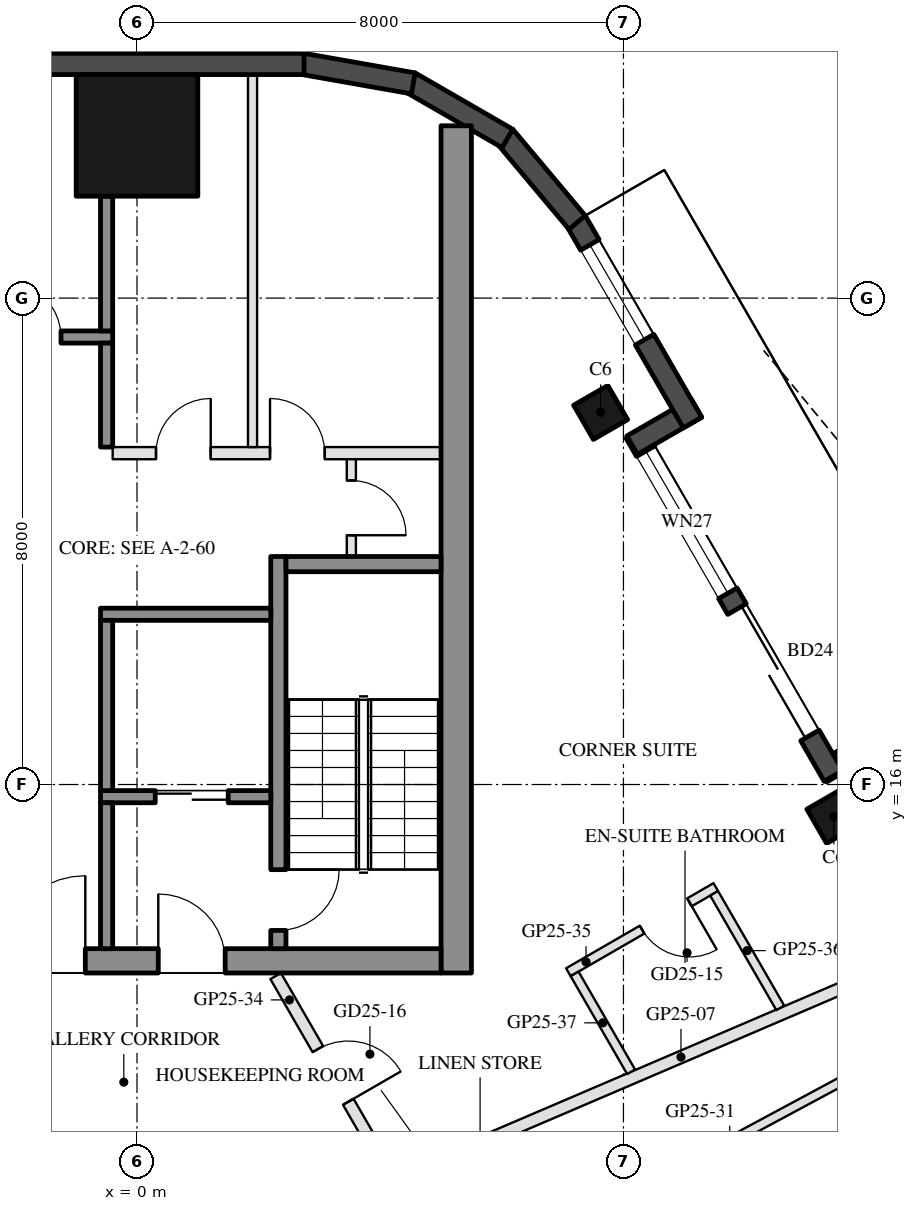
"""IFC4 building model, lengths in metres.
Left out: names, types, materials, properties, quantities, classifications, styles, units other than length and angle.
Written with IfcOpenShell. Run it as: python <this file> out.ifc"""

import sys

from ifc_helpers import new_model, si_unit, direction, frame, frame_2d, origin, origin_2d, place, context, subcontext, project, spatial, rectangle, hollow_rectangle, extrude, boolean, halfspace, element, fill, save


model = new_model("IFC4")
c1 = context("Model", 3, precision=1e-05, world=origin(), true_north=direction((0.0, 1.0)))
c2 = subcontext(c1, "Body", "Model", "MODEL_VIEW")
j1 = project(units=[si_unit("LENGTHUNIT", "METRE"), si_unit("PLANEANGLEUNIT", "RADIAN")], contexts=[c1])
p1 = place(None, origin())
s1 = spatial("IfcSite", under=j1, at=p1, CompositionType="ELEMENT")
p2 = place(p1, origin())
s2 = spatial("IfcBuilding", under=s1, at=p2, CompositionType="ELEMENT")
p3 = place(p2, frame((0.0, 0.0, 257.8)))
s3 = spatial("IfcBuildingStorey", under=s2, at=p3, CompositionType="ELEMENT", Elevation=257.8)
p4 = place(p3, frame((11.461, 15.475, 0.0), z_axis=(0.0, 0.0, 1.0), x_axis=(-0.5, 0.866025403784, 0.0)))
e1 = element("IfcColumn", 1, at=p4, inside=s3, PredefinedType="COLUMN", context=c2, shape_type="SweptSolid", body=[
    boolean("DIFFERENCE", extrude(hollow_rectangle(XDim=0.65, YDim=0.65, WallThickness=0.03, at=origin_2d()), origin(), (0.0, 0.0, 1.0), 3.7), halfspace(frame((0.0, 0.0, 0.04), z_axis=(0.0, 0.0, 1.0), x_axis=(1.0, 0.0, 0.0)), True)),
])
p5 = place(p3, frame((7.625, 22.119, 0.0), z_axis=(0.0, 0.0, 1.0), x_axis=(-0.5, 0.866025403784, 0.0)))
e2 = element("IfcColumn", 2, at=p5, inside=s3, PredefinedType="COLUMN", context=c2, shape_type="SweptSolid", body=[
    boolean("DIFFERENCE", extrude(hollow_rectangle(XDim=0.65, YDim=0.65, WallThickness=0.03, at=origin_2d()), origin(), (0.0, 0.0, 1.0), 3.7), halfspace(frame((0.0, 0.0, 0.047), z_axis=(0.0, 0.0, 1.0), x_axis=(1.0, 0.0, 0.0)), True)),
])
p6 = place(p3, frame((0.0, 26.676, 0.0), z_axis=(0.0, 0.0, 1.0), x_axis=(1.0, 0.0, 0.0)))
e3 = element("IfcColumn", 3, at=p6, inside=s3, PredefinedType="COLUMN", context=c2, shape_type="SweptSolid", body=[
    boolean("DIFFERENCE", extrude(hollow_rectangle(XDim=2.0, YDim=2.0, WallThickness=0.05, at=origin_2d()), origin(), (0.0, 0.0, 1.0), 3.7), halfspace(frame((0.0, 0.0, 0.112), z_axis=(0.0, 0.0, 1.0), x_axis=(1.0, 0.0, 0.0)), True)),
])
p7 = place(p3, frame((12.311, 16.803, 0.0), z_axis=(0.0, 0.0, 1.0), x_axis=(-0.866005645448, -0.500034220881, 0.0)))
e4 = element("IfcWall", 4, at=p7, inside=s3, PredefinedType="SOLIDWALL", context=c2, shape_type="SweptSolid", body=[
    extrude(rectangle(XDim=1.22, YDim=0.35, at=frame_2d((0.61, 0.0))), origin(), (0.0, 0.0, 1.0), 3.55),
])
p8 = place(p3, frame((11.452, 16.14, 0.0), z_axis=(0.0, 0.0, 1.0), x_axis=(-0.49998210071, 0.866035737698, 0.0)))
e5 = element("IfcWall", 5, at=p8, inside=s3, PredefinedType="SOLIDWALL", context=c2, shape_type="SweptSolid", body=[
    extrude(rectangle(XDim=6.511, YDim=0.35, at=frame_2d((3.256, 0.0))), origin(), (0.0, 0.0, 1.0), 3.55),
])
p9 = place(p8, frame((0.77, 0.0, 0.0)))
e6 = element("IfcOpeningElement", 6, at=p9, cuts=e5, PredefinedType="OPENING", context=c2, shape_type="SweptSolid", body=[
    extrude(rectangle(XDim=2.4, YDim=2.4, at=frame_2d((1.2, 1.2))), frame((0.0, 0.185, 0.0), z_axis=(0.0, -1.0, 0.0), x_axis=(1.0, 0.0, 0.0)), (0.0, 0.0, 1.0), 0.37),
])
p10 = place(p8, frame((3.47, 0.0, 0.3)))
e7 = element("IfcOpeningElement", 7, at=p10, cuts=e5, PredefinedType="OPENING", context=c2, shape_type="SweptSolid", body=[
    extrude(rectangle(XDim=2.7, YDim=2.65, at=frame_2d((1.35, 1.325))), frame((0.0, 0.185, 0.0), z_axis=(0.0, -1.0, 0.0), x_axis=(1.0, 0.0, 0.0)), (0.0, 0.0, 1.0), 0.37),
])
p11 = place(p3, frame((8.143, 21.582, 0.0), z_axis=(0.0, 0.0, 1.0), x_axis=(0.866092288191, 0.499884134912, 0.0)))
e8 = element("IfcWall", 8, at=p11, inside=s3, PredefinedType="SOLIDWALL", context=c2, shape_type="SweptSolid", body=[
    extrude(rectangle(XDim=1.22, YDim=0.35, at=frame_2d((0.61, 0.0))), origin(), (0.0, 0.0, 1.0), 3.55),
])
p12 = place(p3, frame((9.135, 21.952, 0.0), z_axis=(0.0, 0.0, 1.0), x_axis=(-0.499972675833, 0.866041178825, 0.0)))
e9 = element("IfcWall", 9, at=p12, inside=s3, PredefinedType="SOLIDWALL", context=c2, shape_type="SweptSolid", body=[
    extrude(rectangle(XDim=3.829, YDim=0.35, at=frame_2d((1.915, 0.0))), origin(), (0.0, 0.0, 1.0), 3.55),
])
p13 = place(p12, frame((1.575, 0.0, 0.3)))
e10 = element("IfcOpeningElement", 10, at=p13, cuts=e9, PredefinedType="OPENING", context=c2, shape_type="SweptSolid", body=[
    extrude(rectangle(XDim=1.8, YDim=2.65, at=frame_2d((0.9, 1.325))), frame((0.0, 0.185, 0.0), z_axis=(0.0, -1.0, 0.0), x_axis=(1.0, 0.0, 0.0)), (0.0, 0.0, 1.0), 0.37),
])
p14 = place(p3, frame((7.239, 25.243, 0.0), z_axis=(0.0, 0.0, 1.0), x_axis=(-0.642756798522, 0.7660702957, 0.0)))
e11 = element("IfcWall", 11, at=p14, inside=s3, PredefinedType="SOLIDWALL", context=c2, shape_type="SweptSolid", body=[
    extrude(rectangle(XDim=1.855, YDim=0.35, at=frame_2d((0.928, 0.0))), origin(), (0.0, 0.0, 1.0), 3.55),
])
p15 = place(p3, frame((6.093, 26.625, 0.0), z_axis=(0.0, 0.0, 1.0), x_axis=(-0.866080385203, 0.499904757295, 0.0)))
e12 = element("IfcWall", 12, at=p15, inside=s3, PredefinedType="SOLIDWALL", context=c2, shape_type="SweptSolid", body=[
    extrude(rectangle(XDim=1.855, YDim=0.35, at=frame_2d((0.927, 0.0))), origin(), (0.0, 0.0, 1.0), 3.55),
])
p16 = place(p3, frame((4.544, 27.532, 0.0), z_axis=(0.0, 0.0, 1.0), x_axis=(-0.984795480386, 0.173717764815, 0.0)))
e13 = element("IfcWall", 13, at=p16, inside=s3, PredefinedType="SOLIDWALL", context=c2, shape_type="SweptSolid", body=[
    extrude(rectangle(XDim=1.855, YDim=0.35, at=frame_2d((0.928, 0.0))), origin(), (0.0, 0.0, 1.0), 3.55),
])
p17 = place(p3, frame((2.747, 27.851, 0.0), z_axis=(0.0, 0.0, 1.0), x_axis=(-1.0, 0.0, 0.0)))
e14 = element("IfcWall", 14, at=p17, inside=s3, PredefinedType="SOLIDWALL", context=c2, shape_type="SweptSolid", body=[
    extrude(rectangle(XDim=5.495, YDim=0.35, at=frame_2d((2.747, 0.0))), origin(), (0.0, 0.0, 1.0), 3.55),
])
p18 = place(p3, frame((5.25, 12.9, 0.0), z_axis=(0.0, 0.0, 1.0), x_axis=(0.0, 1.0, 0.0)))
e15 = element("IfcWall", 15, at=p18, inside=s3, PredefinedType="SHEAR", context=c2, shape_type="SweptSolid", body=[
    extrude(rectangle(XDim=13.934, YDim=0.5, at=frame_2d((6.967, 0.0))), origin(), (0.0, 0.0, 1.0), 3.5),
])
p19 = place(p3, frame((5.0, 13.1, 0.0), z_axis=(0.0, 0.0, 1.0), x_axis=(-1.0, 0.0, 0.0)))
e16 = element("IfcWall", 16, at=p19, inside=s3, PredefinedType="SHEAR", context=c2, shape_type="SweptSolid", body=[
    extrude(rectangle(XDim=10.0, YDim=0.4, at=frame_2d((5.0, 0.0))), origin(), (0.0, 0.0, 1.0), 3.5),
])
p20 = place(p19, frame((3.55, 0.0, 0.0)))
e17 = element("IfcOpeningElement", 17, at=p20, cuts=e16, PredefinedType="OPENING", context=c2, shape_type="SweptSolid", body=[
    extrude(rectangle(XDim=1.1, YDim=2.1, at=frame_2d((0.55, 1.05))), frame((0.0, 0.21, 0.0), z_axis=(0.0, -1.0, 0.0), x_axis=(1.0, 0.0, 0.0)), (0.0, 0.0, 1.0), 0.42),
])
p21 = place(p19, frame((5.85, 0.0, 0.0)))
e18 = element("IfcOpeningElement", 18, at=p21, cuts=e16, PredefinedType="OPENING", context=c2, shape_type="SweptSolid", body=[
    extrude(rectangle(XDim=1.4, YDim=2.1, at=frame_2d((0.7, 1.05))), frame((0.0, 0.21, 0.0), z_axis=(0.0, -1.0, 0.0), x_axis=(1.0, 0.0, 0.0)), (0.0, 0.0, 1.0), 0.42),
])
p22 = place(p3, frame((2.325, 13.3, 0.0), z_axis=(0.0, 0.0, 1.0), x_axis=(0.0, 1.0, 0.0)))
e19 = element("IfcWall", 19, at=p22, inside=s3, PredefinedType="SHEAR", context=c2, shape_type="SweptSolid", body=[
    extrude(rectangle(XDim=6.45, YDim=0.25, at=frame_2d((3.225, 0.0))), origin(), (0.0, 0.0, 1.0), 3.5),
])
p23 = place(p22, frame((0.3, 0.0, 0.0)))
e20 = element("IfcOpeningElement", 20, at=p23, cuts=e19, PredefinedType="OPENING", context=c2, shape_type="SweptSolid", body=[
    extrude(rectangle(XDim=1.0, YDim=2.1, at=frame_2d((0.5, 1.05))), frame((0.0, 0.135, 0.0), z_axis=(0.0, -1.0, 0.0), x_axis=(1.0, 0.0, 0.0)), (0.0, 0.0, 1.0), 0.27),
])
p24 = place(p3, frame((5.0, 19.625, 0.0), z_axis=(0.0, 0.0, 1.0), x_axis=(-1.0, 0.0, 0.0)))
e21 = element("IfcWall", 21, at=p24, inside=s3, PredefinedType="SHEAR", context=c2, shape_type="SweptSolid", body=[
    extrude(rectangle(XDim=2.55, YDim=0.25, at=frame_2d((1.275, 0.0))), origin(), (0.0, 0.0, 1.0), 3.5),
])
p25 = place(p3, frame((2.2, 18.8, 0.0), z_axis=(0.0, 0.0, 1.0), x_axis=(-1.0, 0.0, 0.0)))
e22 = element("IfcWall", 22, at=p25, inside=s3, PredefinedType="SHEAR", context=c2, shape_type="SweptSolid", body=[
    extrude(rectangle(XDim=2.8, YDim=0.2, at=frame_2d((1.4, 0.0))), origin(), (0.0, 0.0, 1.0), 3.5),
])
p26 = place(p3, frame((2.2, 15.8, 0.0), z_axis=(0.0, 0.0, 1.0), x_axis=(-1.0, 0.0, 0.0)))
e23 = element("IfcWall", 23, at=p26, inside=s3, PredefinedType="SHEAR", context=c2, shape_type="SweptSolid", body=[
    extrude(rectangle(XDim=2.8, YDim=0.2, at=frame_2d((1.4, 0.0))), origin(), (0.0, 0.0, 1.0), 3.5),
])
p27 = place(p26, frame((0.7, 0.0, 0.0)))
e24 = element("IfcOpeningElement", 24, at=p27, cuts=e23, PredefinedType="OPENING", context=c2, shape_type="SweptSolid", body=[
    extrude(rectangle(XDim=1.2, YDim=2.1, at=frame_2d((0.6, 1.05))), frame((0.0, 0.11, 0.0), z_axis=(0.0, -1.0, 0.0), x_axis=(1.0, 0.0, 0.0)), (0.0, 0.0, 1.0), 0.22),
])
p28 = place(p3, frame((-0.5, 15.9, 0.0), z_axis=(0.0, 0.0, 1.0), x_axis=(0.0, 1.0, 0.0)))
e25 = element("IfcWall", 25, at=p28, inside=s3, PredefinedType="SHEAR", context=c2, shape_type="SweptSolid", body=[
    extrude(rectangle(XDim=2.8, YDim=0.2, at=frame_2d((1.4, 0.0))), origin(), (0.0, 0.0, 1.0), 3.5),
])
p29 = place(p3, frame((-0.5, 13.3, 0.0), z_axis=(0.0, 0.0, 1.0), x_axis=(0.0, 1.0, 0.0)))
e26 = element("IfcWall", 26, at=p29, inside=s3, PredefinedType="SHEAR", context=c2, shape_type="SweptSolid", body=[
    extrude(rectangle(XDim=2.4, YDim=0.2, at=frame_2d((1.2, 0.0))), origin(), (0.0, 0.0, 1.0), 3.5),
])
p30 = place(p3, frame((-0.4, 23.36, 0.0), z_axis=(0.0, 0.0, 1.0), x_axis=(-1.0, 0.0, 0.0)))
e27 = element("IfcWall", 27, at=p30, inside=s3, PredefinedType="SHEAR", context=c2, shape_type="SweptSolid", body=[
    extrude(rectangle(XDim=2.4, YDim=0.2, at=frame_2d((1.2, 0.0))), origin(), (0.0, 0.0, 1.0), 3.5),
])
p31 = place(p30, frame((0.85, 0.0, 0.0)))
e28 = element("IfcOpeningElement", 28, at=p31, cuts=e27, PredefinedType="OPENING", context=c2, shape_type="SweptSolid", body=[
    extrude(rectangle(XDim=0.9, YDim=2.1, at=frame_2d((0.45, 1.05))), frame((0.0, 0.11, 0.0), z_axis=(0.0, -1.0, 0.0), x_axis=(1.0, 0.0, 0.0)), (0.0, 0.0, 1.0), 0.22),
])
p32 = place(p3, frame((-0.5, 21.55, 0.0), z_axis=(0.0, 0.0, 1.0), x_axis=(0.0, 1.0, 0.0)))
e29 = element("IfcWall", 29, at=p32, inside=s3, PredefinedType="SHEAR", context=c2, shape_type="SweptSolid", body=[
    extrude(rectangle(XDim=1.71, YDim=0.2, at=frame_2d((0.855, 0.0))), origin(), (0.0, 0.0, 1.0), 3.5),
])
p33 = place(p3, frame((-0.5, 23.46, 0.0), z_axis=(0.0, 0.0, 1.0), x_axis=(0.0, 1.0, 0.0)))
e30 = element("IfcWall", 30, at=p33, inside=s3, PredefinedType="SHEAR", context=c2, shape_type="SweptSolid", body=[
    extrude(rectangle(XDim=2.216, YDim=0.2, at=frame_2d((1.108, 0.0))), origin(), (0.0, 0.0, 1.0), 3.5),
])
p34 = place(p3, frame((5.0, 21.45, 0.0), z_axis=(0.0, 0.0, 1.0), x_axis=(-1.0, 0.0, 0.0)))
e31 = element("IfcWall", 31, at=p34, inside=s3, PredefinedType="PARTITIONING", context=c2, shape_type="SweptSolid", body=[
    extrude(rectangle(XDim=5.4, YDim=0.2, at=frame_2d((2.7, 0.0))), origin(), (0.0, 0.0, 1.0), 3.5),
])
p35 = place(p34, frame((1.913, 0.0, 0.0)))
e32 = element("IfcOpeningElement", 32, at=p35, cuts=e31, PredefinedType="OPENING", context=c2, shape_type="SweptSolid", body=[
    extrude(rectangle(XDim=0.9, YDim=2.1, at=frame_2d((0.45, 1.05))), frame((0.0, 0.11, 0.0), z_axis=(0.0, -1.0, 0.0), x_axis=(1.0, 0.0, 0.0)), (0.0, 0.0, 1.0), 0.22),
])
p36 = place(p34, frame((3.788, 0.0, 0.0)))
e33 = element("IfcOpeningElement", 33, at=p36, cuts=e31, PredefinedType="OPENING", context=c2, shape_type="SweptSolid", body=[
    extrude(rectangle(XDim=0.9, YDim=2.1, at=frame_2d((0.45, 1.05))), frame((0.0, 0.11, 0.0), z_axis=(0.0, -1.0, 0.0), x_axis=(1.0, 0.0, 0.0)), (0.0, 0.0, 1.0), 0.22),
])
p37 = place(p3, frame((3.525, 19.75, 0.0), z_axis=(0.0, 0.0, 1.0), x_axis=(0.0, 1.0, 0.0)))
e34 = element("IfcWall", 34, at=p37, inside=s3, PredefinedType="PARTITIONING", context=c2, shape_type="SweptSolid", body=[
    extrude(rectangle(XDim=1.6, YDim=0.15, at=frame_2d((0.8, 0.0))), origin(), (0.0, 0.0, 1.0), 3.5),
])
p38 = place(p37, frame((0.35, 0.0, 0.0)))
e35 = element("IfcOpeningElement", 35, at=p38, cuts=e34, PredefinedType="OPENING", context=c2, shape_type="SweptSolid", body=[
    extrude(rectangle(XDim=0.9, YDim=2.1, at=frame_2d((0.45, 1.05))), frame((0.0, 0.085, 0.0), z_axis=(0.0, -1.0, 0.0), x_axis=(1.0, 0.0, 0.0)), (0.0, 0.0, 1.0), 0.17),
])
p39 = place(p3, frame((1.9, 21.55, 0.0), z_axis=(0.0, 0.0, 1.0), x_axis=(0.0, 1.0, 0.0)))
e36 = element("IfcWall", 36, at=p39, inside=s3, PredefinedType="PARTITIONING", context=c2, shape_type="SweptSolid", body=[
    extrude(rectangle(XDim=6.126, YDim=0.15, at=frame_2d((3.063, 0.0))), origin(), (0.0, 0.0, 1.0), 3.5),
])
p40 = place(p3, frame((14.906, 11.608, 0.0), z_axis=(0.0, 0.0, 1.0), x_axis=(-0.835212554653, -0.549927257507, 0.0)))
e37 = element("IfcWall", 37, at=p40, inside=s3, PredefinedType="PARTITIONING", context=c2, shape_type="SweptSolid", body=[
    extrude(rectangle(XDim=10.431, YDim=0.2, at=frame_2d((5.216, 0.0))), origin(), (0.0, 0.0, 1.0), 3.16),
])
p41 = place(p3, frame((13.766, 13.583, 0.0), z_axis=(0.0, 0.0, 1.0), x_axis=(-0.919210042537, -0.393767568115, 0.0)))
e38 = element("IfcWall", 38, at=p41, inside=s3, PredefinedType="PARTITIONING", context=c2, shape_type="SweptSolid", body=[
    extrude(rectangle(XDim=10.487, YDim=0.2, at=frame_2d((5.243, 0.0))), origin(), (0.0, 0.0, 1.0), 3.16),
])
p42 = place(p3, frame((14.336, 12.595, 0.0), z_axis=(0.0, 0.0, 1.0), x_axis=(-0.880794466183, -0.473498794445, 0.0)))
e39 = element("IfcWall", 39, at=p42, inside=s3, PredefinedType="PARTITIONING", context=c2, shape_type="SweptSolid", body=[
    extrude(rectangle(XDim=10.418, YDim=0.15, at=frame_2d((5.209, 0.0))), origin(), (0.0, 0.0, 1.0), 3.0),
])
p43 = place(p3, frame((2.281, 12.85, 0.0), z_axis=(0.0, 0.0, 1.0), x_axis=(0.499978071388, -0.866038063904, 0.0)))
e40 = element("IfcWall", 40, at=p43, inside=s3, PredefinedType="PARTITIONING", context=c2, shape_type="SweptSolid", body=[
    extrude(rectangle(XDim=3.776, YDim=0.2, at=frame_2d((1.888, 0.0))), origin(), (0.0, 0.0, 1.0), 3.0),
])
p44 = place(p43, frame((1.388, 0.0, 0.0)))
e41 = element("IfcOpeningElement", 41, at=p44, cuts=e40, PredefinedType="OPENING", context=c2, shape_type="SweptSolid", body=[
    extrude(rectangle(XDim=1.0, YDim=2.1, at=frame_2d((0.5, 1.05))), frame((0.0, 0.11, 0.0), z_axis=(0.0, -1.0, 0.0), x_axis=(1.0, 0.0, 0.0)), (0.0, 0.0, 1.0), 0.22),
])
p45 = place(p3, frame((9.519, 14.313, 0.0), z_axis=(0.0, 0.0, 1.0), x_axis=(-0.865996816683, -0.500049511043, 0.0)))
e42 = element("IfcWall", 42, at=p45, inside=s3, PredefinedType="PARTITIONING", context=c2, shape_type="SweptSolid", body=[
    extrude(rectangle(XDim=2.8, YDim=0.15, at=frame_2d((1.4, 0.0))), origin(), (0.0, 0.0, 1.0), 3.0),
])
p46 = place(p45, frame((0.5, 0.0, 0.0)))
e43 = element("IfcOpeningElement", 43, at=p46, cuts=e42, PredefinedType="OPENING", context=c2, shape_type="SweptSolid", body=[
    extrude(rectangle(XDim=0.9, YDim=2.1, at=frame_2d((0.45, 1.05))), frame((0.0, 0.085, 0.0), z_axis=(0.0, -1.0, 0.0), x_axis=(1.0, 0.0, 0.0)), (0.0, 0.0, 1.0), 0.17),
])
p47 = place(p3, frame((10.579, 12.326, 0.0), z_axis=(0.0, 0.0, 1.0), x_axis=(-0.499965319569, 0.866045425615, 0.0)))
e44 = element("IfcWall", 44, at=p47, inside=s3, PredefinedType="PARTITIONING", context=c2, shape_type="SweptSolid", body=[
    extrude(rectangle(XDim=2.176, YDim=0.15, at=frame_2d((1.088, 0.0))), origin(), (0.0, 0.0, 1.0), 3.55),
])
p48 = place(p3, frame((8.126, 11.276, 0.0), z_axis=(0.0, 0.0, 1.0), x_axis=(-0.500093796661, 0.865971243484, 0.0)))
e45 = element("IfcWall", 45, at=p48, inside=s3, PredefinedType="PARTITIONING", context=c2, shape_type="SweptSolid", body=[
    extrude(rectangle(XDim=1.859, YDim=0.15, at=frame_2d((0.93, 0.0))), origin(), (0.0, 0.0, 1.0), 3.55),
])
p49 = place(p9, frame((2.4, 0.0, 0.0), z_axis=(0.0, 0.0, 1.0), x_axis=(-1.0, 0.0, 0.0)))
e46 = element("IfcDoor", 46, at=p49, inside=s3, OperationType="SLIDING_TO_LEFT", PredefinedType="DOOR", context=c2, shape_type="SweptSolid", body=[
    extrude(rectangle(XDim=2.4, YDim=2.4, at=frame_2d((1.2, 1.2))), frame((0.0, 0.025, 0.0), z_axis=(0.0, -1.0, 0.0), x_axis=(1.0, 0.0, 0.0)), (0.0, 0.0, 1.0), 0.05),
])
fill(e6, e46)
p50 = place(p10, origin())
e47 = element("IfcWindow", 47, at=p50, inside=s3, PartitioningType="SINGLE_PANEL", PredefinedType="WINDOW", context=c2, shape_type="SweptSolid", body=[
    extrude(rectangle(XDim=2.7, YDim=2.65, at=frame_2d((1.35, 1.325))), frame((0.0, 0.03, 0.0), z_axis=(0.0, -1.0, 0.0), x_axis=(1.0, 0.0, 0.0)), (0.0, 0.0, 1.0), 0.06),
])
fill(e7, e47)
p51 = place(p13, origin())
e48 = element("IfcWindow", 48, at=p51, inside=s3, PartitioningType="SINGLE_PANEL", PredefinedType="WINDOW", context=c2, shape_type="SweptSolid", body=[
    extrude(rectangle(XDim=1.8, YDim=2.65, at=frame_2d((0.9, 1.325))), frame((0.0, 0.03, 0.0), z_axis=(0.0, -1.0, 0.0), x_axis=(1.0, 0.0, 0.0)), (0.0, 0.0, 1.0), 0.06),
])
fill(e10, e48)
p52 = place(p27, origin())
e49 = element("IfcDoor", 49, at=p52, inside=s3, OperationType="DOUBLE_DOOR_SLIDING", PredefinedType="DOOR", context=c2, shape_type="SweptSolid", body=[
    extrude(rectangle(XDim=1.2, YDim=2.1, at=frame_2d((0.6, 1.05))), frame((0.0, 0.025, 0.0), z_axis=(0.0, -1.0, 0.0), x_axis=(1.0, 0.0, 0.0)), (0.0, 0.0, 1.0), 0.05),
])
fill(e24, e49)
p53 = place(p38, frame((0.9, 0.0, 0.0), z_axis=(0.0, 0.0, 1.0), x_axis=(-1.0, 0.0, 0.0)))
e50 = element("IfcDoor", 50, at=p53, inside=s3, OperationType="SINGLE_SWING_RIGHT", PredefinedType="DOOR", context=c2, shape_type="SweptSolid", body=[
    extrude(rectangle(XDim=0.9, YDim=2.1, at=frame_2d((0.45, 1.05))), frame((0.0, 0.025, 0.0), z_axis=(0.0, -1.0, 0.0), x_axis=(1.0, 0.0, 0.0)), (0.0, 0.0, 1.0), 0.05),
])
fill(e35, e50)
p54 = place(p31, frame((0.9, 0.0, 0.0), z_axis=(0.0, 0.0, 1.0), x_axis=(-1.0, 0.0, 0.0)))
e51 = element("IfcDoor", 51, at=p54, inside=s3, OperationType="SINGLE_SWING_LEFT", PredefinedType="DOOR", context=c2, shape_type="SweptSolid", body=[
    extrude(rectangle(XDim=0.9, YDim=2.1, at=frame_2d((0.45, 1.05))), frame((0.0, 0.025, 0.0), z_axis=(0.0, -1.0, 0.0), x_axis=(1.0, 0.0, 0.0)), (0.0, 0.0, 1.0), 0.05),
])
fill(e28, e51)
p55 = place(p35, frame((0.9, 0.0, 0.0), z_axis=(0.0, 0.0, 1.0), x_axis=(-1.0, 0.0, 0.0)))
e52 = element("IfcDoor", 52, at=p55, inside=s3, OperationType="SINGLE_SWING_LEFT", PredefinedType="DOOR", context=c2, shape_type="SweptSolid", body=[
    extrude(rectangle(XDim=0.9, YDim=2.1, at=frame_2d((0.45, 1.05))), frame((0.0, 0.025, 0.0), z_axis=(0.0, -1.0, 0.0), x_axis=(1.0, 0.0, 0.0)), (0.0, 0.0, 1.0), 0.05),
])
fill(e32, e52)
p56 = place(p36, frame((0.9, 0.0, 0.0), z_axis=(0.0, 0.0, 1.0), x_axis=(-1.0, 0.0, 0.0)))
e53 = element("IfcDoor", 53, at=p56, inside=s3, OperationType="SINGLE_SWING_RIGHT", PredefinedType="DOOR", context=c2, shape_type="SweptSolid", body=[
    extrude(rectangle(XDim=0.9, YDim=2.1, at=frame_2d((0.45, 1.05))), frame((0.0, 0.025, 0.0), z_axis=(0.0, -1.0, 0.0), x_axis=(1.0, 0.0, 0.0)), (0.0, 0.0, 1.0), 0.05),
])
fill(e33, e53)
p57 = place(p20, frame((1.1, 0.0, 0.0), z_axis=(0.0, 0.0, 1.0), x_axis=(-1.0, 0.0, 0.0)))
e54 = element("IfcDoor", 54, at=p57, inside=s3, OperationType="SINGLE_SWING_LEFT", PredefinedType="DOOR", context=c2, shape_type="SweptSolid", body=[
    extrude(rectangle(XDim=1.1, YDim=2.1, at=frame_2d((0.55, 1.05))), frame((0.0, 0.025, 0.0), z_axis=(0.0, -1.0, 0.0), x_axis=(1.0, 0.0, 0.0)), (0.0, 0.0, 1.0), 0.05),
])
fill(e17, e54)
p58 = place(p21, frame((1.4, 0.0, 0.0), z_axis=(0.0, 0.0, 1.0), x_axis=(-1.0, 0.0, 0.0)))
e55 = element("IfcDoor", 55, at=p58, inside=s3, OperationType="DOUBLE_DOOR_SINGLE_SWING", PredefinedType="DOOR", context=c2, shape_type="SweptSolid", body=[
    extrude(rectangle(XDim=1.4, YDim=2.1, at=frame_2d((0.7, 1.05))), frame((0.0, 0.025, 0.0), z_axis=(0.0, -1.0, 0.0), x_axis=(1.0, 0.0, 0.0)), (0.0, 0.0, 1.0), 0.05),
])
fill(e18, e55)
p59 = place(p23, frame((1.0, 0.0, 0.0), z_axis=(0.0, 0.0, 1.0), x_axis=(-1.0, 0.0, 0.0)))
e56 = element("IfcDoor", 56, at=p59, inside=s3, OperationType="SINGLE_SWING_LEFT", PredefinedType="DOOR", context=c2, shape_type="SweptSolid", body=[
    extrude(rectangle(XDim=1.0, YDim=2.1, at=frame_2d((0.5, 1.05))), frame((0.0, 0.025, 0.0), z_axis=(0.0, -1.0, 0.0), x_axis=(1.0, 0.0, 0.0)), (0.0, 0.0, 1.0), 0.05),
])
fill(e20, e56)
p60 = place(p46, origin())
e57 = element("IfcDoor", 57, at=p60, inside=s3, OperationType="SINGLE_SWING_LEFT", PredefinedType="DOOR", context=c2, shape_type="SweptSolid", body=[
    extrude(rectangle(XDim=0.9, YDim=2.1, at=frame_2d((0.45, 1.05))), frame((0.0, 0.025, 0.0), z_axis=(0.0, -1.0, 0.0), x_axis=(1.0, 0.0, 0.0)), (0.0, 0.0, 1.0), 0.05),
])
fill(e43, e57)
p61 = place(p44, origin())
e58 = element("IfcDoor", 58, at=p61, inside=s3, OperationType="SINGLE_SWING_RIGHT", PredefinedType="DOOR", context=c2, shape_type="SweptSolid", body=[
    extrude(rectangle(XDim=1.0, YDim=2.1, at=frame_2d((0.5, 1.05))), frame((0.0, 0.025, 0.0), z_axis=(0.0, -1.0, 0.0), x_axis=(1.0, 0.0, 0.0)), (0.0, 0.0, 1.0), 0.05),
])
fill(e41, e58)
save(model, sys.argv[1])
